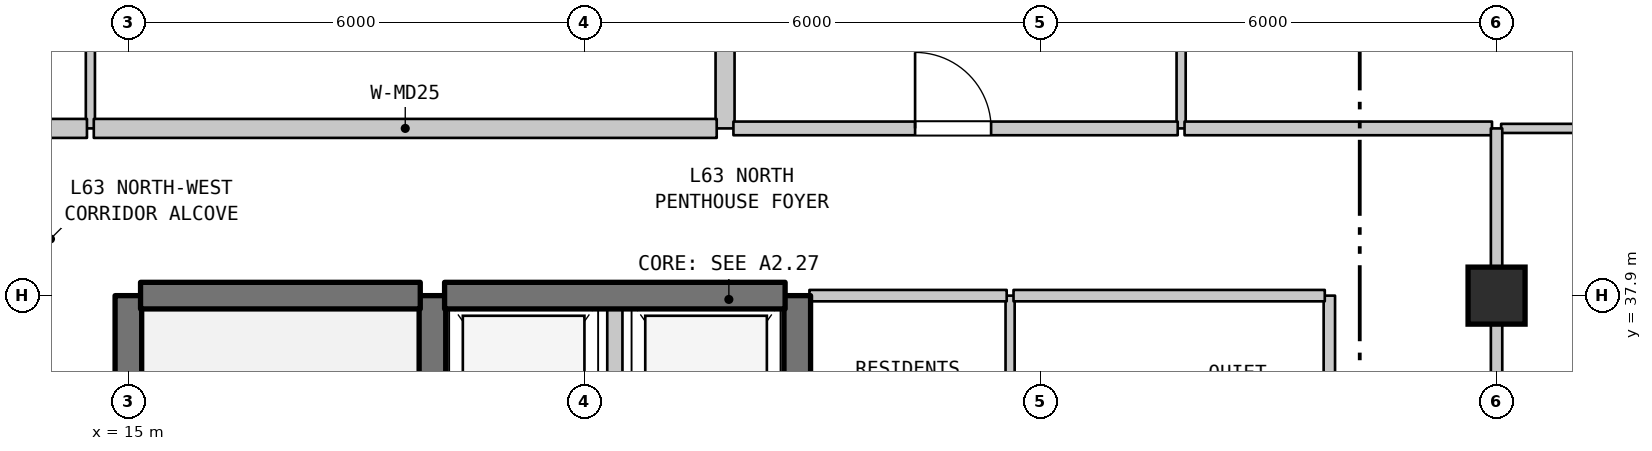
"""IFC4 building model, lengths in metres.
Left out: names, types, materials, properties, quantities, classifications, styles, units other than length and angle.
Written with IfcOpenShell. Run it as: python <this file> out.ifc"""

import sys

from ifc_helpers import new_model, si_unit, direction, frame, frame_2d, origin, origin_2d, place, context, subcontext, project, spatial, rectangle, extrude, element, fill, save


model = new_model("IFC4")
c1 = context("Model", 3, precision=1e-05, world=origin(), true_north=direction((0.0, 1.0)))
c2 = subcontext(c1, "Body", "Model", "MODEL_VIEW")
j1 = project(units=[si_unit("LENGTHUNIT", "METRE"), si_unit("PLANEANGLEUNIT", "RADIAN")], contexts=[c1])
p1 = place(None, origin())
s1 = spatial("IfcSite", under=j1, at=p1, CompositionType="ELEMENT")
p2 = place(p1, origin())
s2 = spatial("IfcBuilding", under=s1, at=p2, CompositionType="ELEMENT")
p3 = place(p2, frame((0.0, 0.0, 254.7)))
s3 = spatial("IfcBuildingStorey", under=s2, at=p3, CompositionType="ELEMENT", Elevation=254.7)
p4 = place(p3, frame((33.0, 37.9, 0.0), z_axis=(0.0, 0.0, 1.0), x_axis=(1.0, 0.0, 0.0)))
e1 = element("IfcColumn", 1, at=p4, inside=s3, PredefinedType="COLUMN", context=c2, shape_type="SweptSolid", body=[
    extrude(rectangle(XDim=0.75, YDim=0.75, at=origin_2d()), origin(), (0.0, 0.0, 1.0), 3.7),
])
p5 = place(p3, frame((14.5, 40.1, 0.0), z_axis=(0.0, 0.0, 1.0), x_axis=(0.0, 1.0, 0.0)))
e2 = element("IfcWall", 2, at=p5, inside=s3, PredefinedType="PARTITIONING", context=c2, shape_type="SweptSolid", body=[
    extrude(rectangle(XDim=4.2, YDim=0.12, at=frame_2d((2.1, 0.0))), origin(), (0.0, 0.0, 1.0), 3.39),
])
p6 = place(p3, frame((15.0, 31.1, 0.0), z_axis=(0.0, 0.0, 1.0), x_axis=(0.0, 1.0, 0.0)))
e3 = element("IfcWall", 3, at=p6, inside=s3, PredefinedType="SHEAR", context=c2, shape_type="SweptSolid", body=[
    extrude(rectangle(XDim=6.8, YDim=0.35, at=frame_2d((3.4, 0.0))), origin(), (0.0, 0.0, 1.0), 3.39),
])
p7 = place(p3, frame((19.0, 35.0, 0.0), z_axis=(0.0, 0.0, 1.0), x_axis=(0.0, 1.0, 0.0)))
e4 = element("IfcWall", 4, at=p7, inside=s3, PredefinedType="SHEAR", context=c2, shape_type="SweptSolid", body=[
    extrude(rectangle(XDim=2.9, YDim=0.35, at=frame_2d((1.45, 0.0))), origin(), (0.0, 0.0, 1.0), 3.39),
])
p8 = place(p3, frame((21.4, 35.0, 0.0), z_axis=(0.0, 0.0, 1.0), x_axis=(0.0, 1.0, 0.0)))
e5 = element("IfcWall", 5, at=p8, inside=s3, PredefinedType="STANDARD", context=c2, shape_type="SweptSolid", body=[
    extrude(rectangle(XDim=2.9, YDim=0.2, at=frame_2d((1.45, 0.0))), origin(), (0.0, 0.0, 1.0), 3.39),
])
p9 = place(p3, frame((22.85, 40.1, 0.0), z_axis=(0.0, 0.0, 1.0), x_axis=(0.0, 1.0, 0.0)))
e6 = element("IfcWall", 6, at=p9, inside=s3, PredefinedType="STANDARD", context=c2, shape_type="SweptSolid", body=[
    extrude(rectangle(XDim=4.2, YDim=0.25, at=frame_2d((2.1, 0.0))), origin(), (0.0, 0.0, 1.0), 3.39),
])
p10 = place(p9, frame((1.577, 0.0, 0.0)))
e7 = element("IfcOpeningElement", 7, at=p10, cuts=e6, PredefinedType="OPENING", context=c2, shape_type="SweptSolid", body=[
    extrude(rectangle(XDim=0.9, YDim=2.15, at=frame_2d((0.45, 1.075))), frame((0.0, 0.135, 0.0), z_axis=(0.0, -1.0, 0.0), x_axis=(1.0, 0.0, 0.0)), (0.0, 0.0, 1.0), 0.27),
])
p11 = place(p3, frame((23.8, 35.0, 0.0), z_axis=(0.0, 0.0, 1.0), x_axis=(0.0, 1.0, 0.0)))
e8 = element("IfcWall", 8, at=p11, inside=s3, PredefinedType="SHEAR", context=c2, shape_type="SweptSolid", body=[
    extrude(rectangle(XDim=2.9, YDim=0.35, at=frame_2d((1.45, 0.0))), origin(), (0.0, 0.0, 1.0), 3.39),
])
p12 = place(p3, frame((26.6, 35.0, 0.0), z_axis=(0.0, 0.0, 1.0), x_axis=(0.0, 1.0, 0.0)))
e9 = element("IfcWall", 9, at=p12, inside=s3, PredefinedType="PARTITIONING", context=c2, shape_type="SweptSolid", body=[
    extrude(rectangle(XDim=2.9, YDim=0.12, at=frame_2d((1.45, 0.0))), origin(), (0.0, 0.0, 1.0), 3.39),
])
p13 = place(p3, frame((28.85, 40.1, 0.0), z_axis=(0.0, 0.0, 1.0), x_axis=(0.0, 1.0, 0.0)))
e10 = element("IfcWall", 10, at=p13, inside=s3, PredefinedType="PARTITIONING", context=c2, shape_type="SweptSolid", body=[
    extrude(rectangle(XDim=13.79, YDim=0.12, at=frame_2d((6.895, 0.0))), origin(), (0.0, 0.0, 1.0), 3.39),
])
p14 = place(p13, frame((6.2, 0.0, 0.0)))
e11 = element("IfcOpeningElement", 11, at=p14, cuts=e10, PredefinedType="OPENING", context=c2, shape_type="SweptSolid", body=[
    extrude(rectangle(XDim=0.9, YDim=2.15, at=frame_2d((0.45, 1.075))), frame((0.0, 0.07, 0.0), z_axis=(0.0, -1.0, 0.0), x_axis=(1.0, 0.0, 0.0)), (0.0, 0.0, 1.0), 0.14),
])
p15 = place(p3, frame((30.8, 35.0, 0.0), z_axis=(0.0, 0.0, 1.0), x_axis=(0.0, 1.0, 0.0)))
e12 = element("IfcWall", 12, at=p15, inside=s3, PredefinedType="STANDARD", context=c2, shape_type="SweptSolid", body=[
    extrude(rectangle(XDim=2.9, YDim=0.15, at=frame_2d((1.45, 0.0))), origin(), (0.0, 0.0, 1.0), 3.39),
])
p16 = place(p3, frame((15.16, 37.9, 0.0), z_axis=(0.0, 0.0, 1.0), x_axis=(1.0, 0.0, 0.0)))
e13 = element("IfcWall", 13, at=p16, inside=s3, PredefinedType="SHEAR", context=c2, shape_type="SweptSolid", body=[
    extrude(rectangle(XDim=3.68, YDim=0.35, at=frame_2d((1.84, 0.0))), origin(), (0.0, 0.0, 1.0), 3.39),
])
p17 = place(p3, frame((19.16, 37.9, 0.0), z_axis=(0.0, 0.0, 1.0), x_axis=(1.0, 0.0, 0.0)))
e14 = element("IfcWall", 14, at=p17, inside=s3, PredefinedType="SHEAR", context=c2, shape_type="SweptSolid", body=[
    extrude(rectangle(XDim=4.48, YDim=0.35, at=frame_2d((2.24, 0.0))), origin(), (0.0, 0.0, 1.0), 3.39),
])
p18 = place(p3, frame((23.96, 37.9, 0.0), z_axis=(0.0, 0.0, 1.0), x_axis=(1.0, 0.0, 0.0)))
e15 = element("IfcWall", 15, at=p18, inside=s3, PredefinedType="STANDARD", context=c2, shape_type="SweptSolid", body=[
    extrude(rectangle(XDim=2.595, YDim=0.15, at=frame_2d((1.297, 0.0))), origin(), (0.0, 0.0, 1.0), 2.89),
])
p19 = place(p3, frame((26.645, 37.9, 0.0), z_axis=(0.0, 0.0, 1.0), x_axis=(1.0, 0.0, 0.0)))
e16 = element("IfcWall", 16, at=p19, inside=s3, PredefinedType="STANDARD", context=c2, shape_type="SweptSolid", body=[
    extrude(rectangle(XDim=4.095, YDim=0.15, at=frame_2d((2.047, 0.0))), origin(), (0.0, 0.0, 1.0), 2.89),
])
p20 = place(p3, frame((12.975, 40.1, 0.0), z_axis=(0.0, 0.0, 1.0), x_axis=(1.0, 0.0, 0.0)))
e17 = element("IfcWall", 17, at=p20, inside=s3, PredefinedType="STANDARD", context=c2, shape_type="SweptSolid", body=[
    extrude(rectangle(XDim=1.48, YDim=0.25, at=frame_2d((0.74, 0.0))), origin(), (0.0, 0.0, 1.0), 3.39),
])
p21 = place(p3, frame((14.545, 40.1, 0.0), z_axis=(0.0, 0.0, 1.0), x_axis=(1.0, 0.0, 0.0)))
e18 = element("IfcWall", 18, at=p21, inside=s3, PredefinedType="STANDARD", context=c2, shape_type="SweptSolid", body=[
    extrude(rectangle(XDim=8.195, YDim=0.25, at=frame_2d((4.098, 0.0))), origin(), (0.0, 0.0, 1.0), 3.39),
])
p22 = place(p3, frame((22.96, 40.1, 0.0), z_axis=(0.0, 0.0, 1.0), x_axis=(1.0, 0.0, 0.0)))
e19 = element("IfcWall", 19, at=p22, inside=s3, PredefinedType="STANDARD", context=c2, shape_type="SweptSolid", body=[
    extrude(rectangle(XDim=5.845, YDim=0.18, at=frame_2d((2.922, 0.0))), origin(), (0.0, 0.0, 1.0), 3.39),
])
p23 = place(p22, frame((2.39, 0.0, 0.0)))
e20 = element("IfcOpeningElement", 20, at=p23, cuts=e19, PredefinedType="OPENING", context=c2, shape_type="SweptSolid", body=[
    extrude(rectangle(XDim=1.0, YDim=2.15, at=frame_2d((0.5, 1.075))), frame((0.0, 0.1, 0.0), z_axis=(0.0, -1.0, 0.0), x_axis=(1.0, 0.0, 0.0)), (0.0, 0.0, 1.0), 0.2),
])
p24 = place(p3, frame((28.895, 40.1, 0.0), z_axis=(0.0, 0.0, 1.0), x_axis=(1.0, 0.0, 0.0)))
e21 = element("IfcWall", 21, at=p24, inside=s3, PredefinedType="STANDARD", context=c2, shape_type="SweptSolid", body=[
    extrude(rectangle(XDim=4.045, YDim=0.18, at=frame_2d((2.022, 0.0))), origin(), (0.0, 0.0, 1.0), 3.39),
])
p25 = place(p3, frame((33.06, 40.1, 0.0), z_axis=(0.0, 0.0, 1.0), x_axis=(1.0, 0.0, 0.0)))
e22 = element("IfcWall", 22, at=p25, inside=s3, PredefinedType="PARTITIONING", context=c2, shape_type="SweptSolid", body=[
    extrude(rectangle(XDim=1.115, YDim=0.12, at=frame_2d((0.558, 0.0))), origin(), (0.0, 0.0, 1.0), 3.39),
])
p26 = place(p3, frame((33.0, 27.9, 0.0), z_axis=(0.0, 0.0, 1.0), x_axis=(0.0, 1.0, 0.0)))
e23 = element("IfcWall", 23, at=p26, inside=s3, PredefinedType="STANDARD", context=c2, shape_type="SweptSolid", body=[
    extrude(rectangle(XDim=10.0, YDim=0.15, at=frame_2d((5.0, 0.0))), origin(), (0.0, 0.0, 1.0), 2.89),
])
p27 = place(p26, frame((1.4, 0.0, 0.0)))
e24 = element("IfcOpeningElement", 24, at=p27, cuts=e23, PredefinedType="OPENING", context=c2, shape_type="SweptSolid", body=[
    extrude(rectangle(XDim=1.0, YDim=2.15, at=frame_2d((0.5, 1.075))), frame((0.0, 0.085, 0.0), z_axis=(0.0, -1.0, 0.0), x_axis=(1.0, 0.0, 0.0)), (0.0, 0.0, 1.0), 0.17),
])
p28 = place(p3, frame((33.0, 37.9, 0.0), z_axis=(0.0, 0.0, 1.0), x_axis=(0.0, 1.0, 0.0)))
e25 = element("IfcWall", 25, at=p28, inside=s3, PredefinedType="STANDARD", context=c2, shape_type="SweptSolid", body=[
    extrude(rectangle(XDim=2.2, YDim=0.15, at=frame_2d((1.1, 0.0))), origin(), (0.0, 0.0, 1.0), 2.79),
])
p29 = place(p23, origin())
e26 = element("IfcDoor", 26, at=p29, inside=s3, OperationType="SINGLE_SWING_LEFT", PredefinedType="DOOR", context=c2, shape_type="SweptSolid", body=[
    extrude(rectangle(XDim=1.0, YDim=2.15, at=frame_2d((0.5, 1.075))), frame((0.0, 0.025, 0.0), z_axis=(0.0, -1.0, 0.0), x_axis=(1.0, 0.0, 0.0)), (0.0, 0.0, 1.0), 0.05),
])
fill(e20, e26)
save(model, sys.argv[1])
